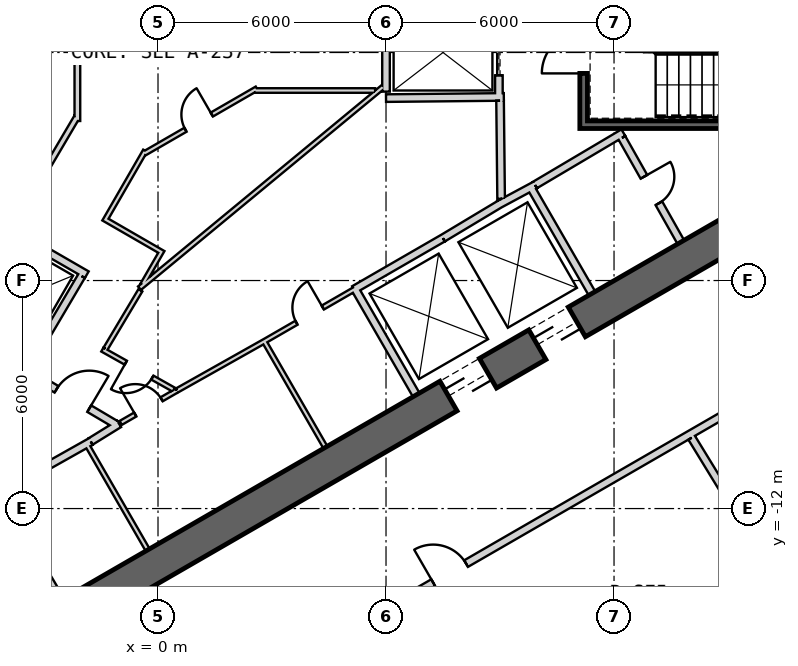
"""IFC4 building model, lengths in metres.
Left out: names, types, materials, properties, quantities, classifications, styles, units other than length and angle.
Written with IfcOpenShell. Run it as: python <this file> out.ifc"""

import sys

from ifc_helpers import new_model, si_unit, direction, frame, frame_2d, origin, place, context, subcontext, project, spatial, rectangle, extrude, element, fill, save


model = new_model("IFC4")
c1 = context("Model", 3, precision=1e-05, world=origin(), true_north=direction((0.0, 1.0)))
c2 = subcontext(c1, "Body", "Model", "MODEL_VIEW")
j1 = project(units=[si_unit("LENGTHUNIT", "METRE"), si_unit("PLANEANGLEUNIT", "RADIAN")], contexts=[c1])
p1 = place(None, origin())
s1 = spatial("IfcSite", under=j1, at=p1, CompositionType="ELEMENT")
p2 = place(p1, origin())
s2 = spatial("IfcBuilding", under=s1, at=p2, CompositionType="ELEMENT")
p3 = place(p2, frame((0.0, 0.0, 345.5)))
s3 = spatial("IfcBuildingStorey", under=s2, at=p3, CompositionType="ELEMENT", Elevation=345.5)
p4 = place(p3, frame((-7.825, -17.97, 0.0), z_axis=(0.0, 0.0, 1.0), x_axis=(0.866028369851, 0.499994862586, 0.0)))
e1 = element("IfcWall", 1, at=p4, inside=s3, PredefinedType="SHEAR", context=c2, shape_type="SweptSolid", body=[
    extrude(rectangle(XDim=31.523, YDim=0.9, at=frame_2d((15.762, 0.0))), origin(), (0.0, 0.0, 1.0), 3.9),
])
p5 = place(p4, frame((17.862, 0.0, 0.0)))
e2 = element("IfcOpeningElement", 2, at=p5, cuts=e1, PredefinedType="OPENING", context=c2, shape_type="SweptSolid", body=[
    extrude(rectangle(XDim=1.2, YDim=2.4, at=frame_2d((0.6, 1.2))), frame((0.0, 0.46, 0.0), z_axis=(0.0, -1.0, 0.0), x_axis=(1.0, 0.0, 0.0)), (0.0, 0.0, 1.0), 0.92),
])
p6 = place(p4, frame((20.562, 0.0, 0.0)))
e3 = element("IfcOpeningElement", 3, at=p6, cuts=e1, PredefinedType="OPENING", context=c2, shape_type="SweptSolid", body=[
    extrude(rectangle(XDim=1.2, YDim=2.4, at=frame_2d((0.6, 1.2))), frame((0.0, 0.46, 0.0), z_axis=(0.0, -1.0, 0.0), x_axis=(1.0, 0.0, 0.0)), (0.0, 0.0, 1.0), 0.92),
])
p7 = place(p4, frame((26.712, 0.0, 0.0)))
e4 = element("IfcOpeningElement", 4, at=p7, cuts=e1, PredefinedType="OPENING", context=c2, shape_type="SweptSolid", body=[
    extrude(rectangle(XDim=1.2, YDim=2.4, at=frame_2d((0.6, 1.2))), frame((0.0, 0.46, 0.0), z_axis=(0.0, -1.0, 0.0), x_axis=(1.0, 0.0, 0.0)), (0.0, 0.0, 1.0), 0.92),
])
p8 = place(p4, frame((3.612, 0.0, 0.0)))
e5 = element("IfcOpeningElement", 5, at=p8, cuts=e1, PredefinedType="OPENING", context=c2, shape_type="SweptSolid", body=[
    extrude(rectangle(XDim=1.2, YDim=2.4, at=frame_2d((0.6, 1.2))), frame((0.0, 0.46, 0.0), z_axis=(0.0, -1.0, 0.0), x_axis=(1.0, 0.0, 0.0)), (0.0, 0.0, 1.0), 0.92),
])
p9 = place(p3, frame((6.795, -9.01, 0.0), z_axis=(0.0, 0.0, 1.0), x_axis=(-0.499984717929, 0.866034226713, 0.0)))
e6 = element("IfcWall", 6, at=p9, inside=s3, PredefinedType="PLUMBINGWALL", context=c2, shape_type="SweptSolid", body=[
    extrude(rectangle(XDim=3.25, YDim=0.2, at=frame_2d((1.625, 0.0))), origin(), (0.0, 0.0, 1.0), 3.6),
])
p10 = place(p3, frame((5.159, -6.236, 0.0), z_axis=(0.0, 0.0, 1.0), x_axis=(0.866036505625, 0.499980770555, 0.0)))
e7 = element("IfcWall", 7, at=p10, inside=s3, PredefinedType="PLUMBINGWALL", context=c2, shape_type="SweptSolid", body=[
    extrude(rectangle(XDim=2.7, YDim=0.2, at=frame_2d((1.35, 0.0))), origin(), (0.0, 0.0, 1.0), 3.6),
])
p11 = place(p3, frame((9.795, -3.525, 0.0), z_axis=(0.0, 0.0, 1.0), x_axis=(0.499984717929, -0.866034226713, 0.0)))
e8 = element("IfcWall", 8, at=p11, inside=s3, PredefinedType="PLUMBINGWALL", context=c2, shape_type="SweptSolid", body=[
    extrude(rectangle(XDim=3.25, YDim=0.2, at=frame_2d((1.625, 0.0))), origin(), (0.0, 0.0, 1.0), 3.6),
])
p12 = place(p3, frame((8.974, -3.999, 0.0), z_axis=(0.0, 0.0, 1.0), x_axis=(0.880907015104, 0.473289373154, 0.0)))
e9 = element("IfcWall", 9, at=p12, inside=s3, PredefinedType="PLUMBINGWALL", context=c2, shape_type="SweptSolid", body=[
    extrude(rectangle(XDim=1.078, YDim=0.2, at=frame_2d((0.539, 0.0))), origin(), (0.0, 0.0, 1.0), 3.6),
])
p13 = place(p3, frame((7.497, -4.886, 0.0), z_axis=(0.0, 0.0, 1.0), x_axis=(0.857516281273, 0.51445682749, 0.0)))
e10 = element("IfcWall", 10, at=p13, inside=s3, PredefinedType="PLUMBINGWALL", context=c2, shape_type="SweptSolid", body=[
    extrude(rectangle(XDim=1.845, YDim=0.2, at=frame_2d((0.922, 0.0))), origin(), (0.0, 0.0, 1.0), 3.6),
])
p14 = place(p3, frame((11.1, -1.9, -0.3), z_axis=(0.0, 0.0, 1.0), x_axis=(1.0, 0.0, 0.0)))
e11 = element("IfcWall", 11, at=p14, inside=s3, PredefinedType="SHEAR", context=c2, shape_type="SweptSolid", body=[
    extrude(rectangle(XDim=7.9, YDim=0.2, at=frame_2d((3.95, 0.0))), origin(), (0.0, 0.0, 1.0), 3.9),
])
p15 = place(p3, frame((11.2, -1.8, -0.3), z_axis=(0.0, 0.0, 1.0), x_axis=(0.0, 1.0, 0.0)))
e12 = element("IfcWall", 12, at=p15, inside=s3, PredefinedType="SHEAR", context=c2, shape_type="SweptSolid", body=[
    extrude(rectangle(XDim=3.6, YDim=0.2, at=frame_2d((1.8, 0.0))), origin(), (0.0, 0.0, 1.0), 3.9),
])
p16 = place(p15, frame((1.25, 0.0, 0.3)))
e13 = element("IfcOpeningElement", 13, at=p16, cuts=e12, PredefinedType="OPENING", context=c2, shape_type="SweptSolid", body=[
    extrude(rectangle(XDim=1.1, YDim=2.1, at=frame_2d((0.55, 1.05))), frame((0.0, 0.11, 0.0), z_axis=(0.0, -1.0, 0.0), x_axis=(1.0, 0.0, 0.0)), (0.0, 0.0, 1.0), 0.22),
])
p17 = place(p3, frame((8.97, 1.2, 0.0), z_axis=(0.0, 0.0, 1.0), x_axis=(0.0, -1.0, 0.0)))
e14 = element("IfcWall", 14, at=p17, inside=s3, PredefinedType="PLUMBINGWALL", context=c2, shape_type="SweptSolid", body=[
    extrude(rectangle(XDim=2.4, YDim=0.2, at=frame_2d((1.2, 0.0))), origin(), (0.0, 0.0, 1.0), 3.6),
])
p18 = place(p17, frame((0.6, 0.0, 0.0)))
e15 = element("IfcOpeningElement", 15, at=p18, cuts=e14, PredefinedType="OPENING", context=c2, shape_type="SweptSolid", body=[
    extrude(rectangle(XDim=1.2, YDim=2.4, at=frame_2d((0.6, 1.2))), frame((0.0, 0.11, 0.0), z_axis=(0.0, -1.0, 0.0), x_axis=(1.0, 0.0, 0.0)), (0.0, 0.0, 1.0), 0.22),
])
p19 = place(p3, frame((9.1, -1.169, 0.0), z_axis=(0.0, 0.0, 1.0), x_axis=(-0.999949988, -0.010001074852, 0.0)))
e16 = element("IfcWall", 16, at=p19, inside=s3, PredefinedType="PLUMBINGWALL", context=c2, shape_type="SweptSolid", body=[
    extrude(rectangle(XDim=3.1, YDim=0.2, at=frame_2d((1.55, 0.0))), origin(), (0.0, 0.0, 1.0), 3.6),
])
p20 = place(p3, frame((6.0, -1.03, 0.0), z_axis=(0.0, 0.0, 1.0), x_axis=(0.0, 1.0, 0.0)))
e17 = element("IfcWall", 17, at=p20, inside=s3, PredefinedType="PLUMBINGWALL", context=c2, shape_type="SweptSolid", body=[
    extrude(rectangle(XDim=2.33, YDim=0.2, at=frame_2d((1.165, 0.0))), origin(), (0.0, 0.0, 1.0), 3.6),
])
p21 = place(p3, frame((-3.957, -4.644, 0.0), z_axis=(0.0, 0.0, 1.0), x_axis=(0.865991127953, -0.500059362782, 0.0)))
e18 = element("IfcWall", 18, at=p21, inside=s3, PredefinedType="PLUMBINGWALL", context=c2, shape_type="SweptSolid", body=[
    extrude(rectangle(XDim=2.405, YDim=0.2, at=frame_2d((1.202, 0.0))), origin(), (0.0, 0.0, 1.0), 3.6),
])
p22 = place(p3, frame((-2.012, -5.882, 0.0), z_axis=(0.0, 0.0, 1.0), x_axis=(-0.508619639323, -0.860991325447, 0.0)))
e19 = element("IfcWall", 19, at=p22, inside=s3, PredefinedType="PLUMBINGWALL", context=c2, shape_type="SweptSolid", body=[
    extrude(rectangle(XDim=3.0, YDim=0.2, at=frame_2d((1.5, 0.0))), origin(), (0.0, 0.0, 1.0), 3.6),
])
p23 = place(p3, frame((-1.897, -10.275, 0.0), z_axis=(0.0, 0.0, 1.0), x_axis=(0.499984717929, -0.866034226713, 0.0)))
e20 = element("IfcWall", 20, at=p23, inside=s3, PredefinedType="PARTITIONING", context=c2, shape_type="SweptSolid", body=[
    extrude(rectangle(XDim=3.25, YDim=0.12, at=frame_2d((1.625, 0.0))), origin(), (0.0, 0.0, 1.0), 3.6),
])
p24 = place(p3, frame((-4.26, -11.524, 0.0), z_axis=(0.0, 0.0, 1.0), x_axis=(0.507997497166, -0.861358544901, 0.0)))
e21 = element("IfcWall", 21, at=p24, inside=s3, PredefinedType="PARTITIONING", context=c2, shape_type="SweptSolid", body=[
    extrude(rectangle(XDim=3.35, YDim=0.2, at=frame_2d((1.675, 0.0))), origin(), (0.0, 0.0, 1.0), 3.6),
])
p25 = place(p24, frame((1.325, 0.0, 0.0)))
e22 = element("IfcOpeningElement", 22, at=p25, cuts=e21, PredefinedType="OPENING", context=c2, shape_type="SweptSolid", body=[
    extrude(rectangle(XDim=0.8, YDim=2.1, at=frame_2d((0.4, 1.05))), frame((0.0, 0.11, 0.0), z_axis=(0.0, -1.0, 0.0), x_axis=(1.0, 0.0, 0.0)), (0.0, 0.0, 1.0), 0.22),
])
p26 = place(p3, frame((-1.769, -10.237, 0.0), z_axis=(0.0, 0.0, 1.0), x_axis=(-0.871534483978, -0.490334215854, 0.0)))
e23 = element("IfcWall", 23, at=p26, inside=s3, PredefinedType="PARTITIONING", context=c2, shape_type="SweptSolid", body=[
    extrude(rectangle(XDim=2.7, YDim=0.2, at=frame_2d((1.35, 0.0))), origin(), (0.0, 0.0, 1.0), 3.6),
])
p27 = place(p3, frame((4.405, -10.389, 0.0), z_axis=(0.0, 0.0, 1.0), x_axis=(-0.500017246033, 0.866015446554, 0.0)))
e24 = element("IfcWall", 24, at=p27, inside=s3, PredefinedType="PARTITIONING", context=c2, shape_type="SweptSolid", body=[
    extrude(rectangle(XDim=3.25, YDim=0.12, at=frame_2d((1.625, 0.0))), origin(), (0.0, 0.0, 1.0), 3.6),
])
p28 = place(p3, frame((-1.024, -9.771, 0.0), z_axis=(0.0, 0.0, 1.0), x_axis=(-0.850348075135, -0.526220629693, 0.0)))
e25 = element("IfcWall", 25, at=p28, inside=s3, PredefinedType="PARTITIONING", context=c2, shape_type="SweptSolid", body=[
    extrude(rectangle(XDim=0.878, YDim=0.2, at=frame_2d((0.439, 0.0))), origin(), (0.0, 0.0, 1.0), 3.6),
])
p29 = place(p3, frame((0.494, -8.896, 0.0), z_axis=(0.0, 0.0, 1.0), x_axis=(0.871426548871, 0.490526013503, 0.0)))
e26 = element("IfcWall", 26, at=p29, inside=s3, PredefinedType="PARTITIONING", context=c2, shape_type="SweptSolid", body=[
    extrude(rectangle(XDim=2.67, YDim=0.12, at=frame_2d((1.335, 0.0))), origin(), (0.0, 0.0, 1.0), 3.6),
])
p30 = place(p3, frame((0.493, -8.895, 0.0), z_axis=(0.0, 0.0, 1.0), x_axis=(-0.866027945518, -0.499995597562, 0.0)))
e27 = element("IfcWall", 27, at=p30, inside=s3, PredefinedType="PARTITIONING", context=c2, shape_type="SweptSolid", body=[
    extrude(rectangle(XDim=1.702, YDim=0.12, at=frame_2d((0.851, 0.0))), origin(), (0.0, 0.0, 1.0), 3.6),
])
p31 = place(p30, frame((0.461, 0.0, 0.0)))
e28 = element("IfcOpeningElement", 28, at=p31, cuts=e27, PredefinedType="OPENING", context=c2, shape_type="SweptSolid", body=[
    extrude(rectangle(XDim=0.8, YDim=2.1, at=frame_2d((0.4, 1.05))), frame((0.0, 0.07, 0.0), z_axis=(0.0, -1.0, 0.0), x_axis=(1.0, 0.0, 0.0)), (0.0, 0.0, 1.0), 0.14),
])
p32 = place(p3, frame((2.821, -7.586, 0.0), z_axis=(0.0, 0.0, 1.0), x_axis=(0.866019956843, 0.50000943426, 0.0)))
e29 = element("IfcWall", 29, at=p32, inside=s3, PredefinedType="PARTITIONING", context=c2, shape_type="SweptSolid", body=[
    extrude(rectangle(XDim=2.7, YDim=0.12, at=frame_2d((1.35, 0.0))), origin(), (0.0, 0.0, 1.0), 3.6),
])
p33 = place(p32, frame((0.95, 0.0, 0.0)))
e30 = element("IfcOpeningElement", 30, at=p33, cuts=e29, PredefinedType="OPENING", context=c2, shape_type="SweptSolid", body=[
    extrude(rectangle(XDim=0.8, YDim=2.1, at=frame_2d((0.4, 1.05))), frame((0.0, 0.07, 0.0), z_axis=(0.0, -1.0, 0.0), x_axis=(1.0, 0.0, 0.0)), (0.0, 0.0, 1.0), 0.14),
])
p34 = place(p3, frame((12.245, -2.109, 0.0), z_axis=(0.0, 0.0, 1.0), x_axis=(-0.860414880418, -0.509594185166, 0.0)))
e31 = element("IfcWall", 31, at=p34, inside=s3, PredefinedType="PARTITIONING", context=c2, shape_type="SweptSolid", body=[
    extrude(rectangle(XDim=2.7, YDim=0.2, at=frame_2d((1.35, 0.0))), origin(), (0.0, 0.0, 1.0), 3.6),
])
p35 = place(p3, frame((13.758, -4.99, 0.0), z_axis=(0.0, 0.0, 1.0), x_axis=(-0.491993409184, 0.87059892334, 0.0)))
e32 = element("IfcWall", 32, at=p35, inside=s3, PredefinedType="PARTITIONING", context=c2, shape_type="SweptSolid", body=[
    extrude(rectangle(XDim=3.15, YDim=0.2, at=frame_2d((1.575, 0.0))), origin(), (0.0, 0.0, 1.0), 3.6),
])
p36 = place(p35, frame((1.175, 0.0, 0.0)))
e33 = element("IfcOpeningElement", 33, at=p36, cuts=e32, PredefinedType="OPENING", context=c2, shape_type="SweptSolid", body=[
    extrude(rectangle(XDim=0.8, YDim=2.1, at=frame_2d((0.4, 1.05))), frame((0.0, 0.11, 0.0), z_axis=(0.0, -1.0, 0.0), x_axis=(1.0, 0.0, 0.0)), (0.0, 0.0, 1.0), 0.22),
])
p37 = place(p3, frame((9.029, -3.851, 0.0), z_axis=(0.0, 0.0, 1.0), x_axis=(-0.010784614026, 0.999941844359, 0.0)))
e34 = element("IfcWall", 34, at=p37, inside=s3, PredefinedType="PARTITIONING", context=c2, shape_type="SweptSolid", body=[
    extrude(rectangle(XDim=2.581, YDim=0.2, at=frame_2d((1.291, 0.0))), origin(), (0.0, 0.0, 1.0), 3.6),
])
p38 = place(p3, frame((-3.401, -8.43, 0.0), z_axis=(0.0, 0.0, 1.0), x_axis=(0.860617791406, -0.509251428192, 0.0)))
e35 = element("IfcWall", 35, at=p38, inside=s3, PredefinedType="PARTITIONING", context=c2, shape_type="SweptSolid", body=[
    extrude(rectangle(XDim=2.709, YDim=0.2, at=frame_2d((1.354, 0.0))), origin(), (0.0, 0.0, 1.0), 3.6),
])
p39 = place(p38, frame((0.848, 0.0, 0.0)))
e36 = element("IfcOpeningElement", 36, at=p39, cuts=e35, PredefinedType="OPENING", context=c2, shape_type="SweptSolid", body=[
    extrude(rectangle(XDim=1.0, YDim=2.1, at=frame_2d((0.5, 1.05))), frame((0.0, 0.11, 0.0), z_axis=(0.0, -1.0, 0.0), x_axis=(1.0, 0.0, 0.0)), (0.0, 0.0, 1.0), 0.22),
])
p40 = place(p3, frame((-2.122, -1.802, 0.0), z_axis=(0.0, 0.0, 1.0), x_axis=(0.0, 1.0, 0.0)))
e37 = element("IfcWall", 37, at=p40, inside=s3, PredefinedType="PLUMBINGWALL", context=c2, shape_type="SweptSolid", body=[
    extrude(rectangle(XDim=3.454, YDim=0.15, at=frame_2d((1.727, 0.0))), origin(), (0.0, 0.0, 1.0), 3.6),
])
p41 = place(p3, frame((-3.841, -4.595, 0.0), z_axis=(0.0, 0.0, 1.0), x_axis=(0.507318157939, 0.861758833216, 0.0)))
e38 = element("IfcWall", 38, at=p41, inside=s3, PredefinedType="PLUMBINGWALL", context=c2, shape_type="SweptSolid", body=[
    extrude(rectangle(XDim=3.365, YDim=0.15, at=frame_2d((1.682, 0.0))), origin(), (0.0, 0.0, 1.0), 3.6),
])
p42 = place(p3, frame((5.936, -0.894, 0.0), z_axis=(0.0, 0.0, 1.0), x_axis=(-0.770832870475, -0.637037428881, 0.0)))
e39 = element("IfcWall", 39, at=p42, inside=s3, PredefinedType="PARTITIONING", context=c2, shape_type="SweptSolid", body=[
    extrude(rectangle(XDim=8.332, YDim=0.12, at=frame_2d((4.166, 0.0))), origin(), (0.0, 0.0, 1.0), 3.6),
])
p43 = place(p3, frame((-0.411, -6.111, 0.0), z_axis=(0.0, 0.0, 1.0), x_axis=(0.49986229611, 0.866104892567, 0.0)))
e40 = element("IfcWall", 40, at=p43, inside=s3, PredefinedType="PARTITIONING", context=c2, shape_type="SweptSolid", body=[
    extrude(rectangle(XDim=1.058, YDim=0.12, at=frame_2d((0.529, 0.0))), origin(), (0.0, 0.0, 1.0), 3.6),
])
p44 = place(p3, frame((-1.436, -4.367, 0.0), z_axis=(0.0, 0.0, 1.0), x_axis=(0.866087547558, -0.499892348375, 0.0)))
e41 = element("IfcWall", 41, at=p44, inside=s3, PredefinedType="PARTITIONING", context=c2, shape_type="SweptSolid", body=[
    extrude(rectangle(XDim=1.7, YDim=0.12, at=frame_2d((0.85, 0.0))), origin(), (0.0, 0.0, 1.0), 3.6),
])
p45 = place(p3, frame((-0.338, -2.585, 0.0), z_axis=(0.0, 0.0, 1.0), x_axis=(-0.50002743572, -0.866009563185, 0.0)))
e42 = element("IfcWall", 42, at=p45, inside=s3, PredefinedType="PARTITIONING", context=c2, shape_type="SweptSolid", body=[
    extrude(rectangle(XDim=2.033, YDim=0.12, at=frame_2d((1.016, 0.0))), origin(), (0.0, 0.0, 1.0), 3.6),
])
p46 = place(p3, frame((2.602, -0.948, 0.0), z_axis=(0.0, 0.0, 1.0), x_axis=(-0.86601279846, -0.500021832428, 0.0)))
e43 = element("IfcWall", 43, at=p46, inside=s3, PredefinedType="PARTITIONING", context=c2, shape_type="SweptSolid", body=[
    extrude(rectangle(XDim=3.435, YDim=0.12, at=frame_2d((1.718, 0.0))), origin(), (0.0, 0.0, 1.0), 3.6),
])
p47 = place(p46, frame((1.37, 0.0, 0.0)))
e44 = element("IfcOpeningElement", 44, at=p47, cuts=e43, PredefinedType="OPENING", context=c2, shape_type="SweptSolid", body=[
    extrude(rectangle(XDim=0.8, YDim=2.1, at=frame_2d((0.4, 1.05))), frame((0.0, 0.07, 0.0), z_axis=(0.0, -1.0, 0.0), x_axis=(1.0, 0.0, 0.0)), (0.0, 0.0, 1.0), 0.14),
])
p48 = place(p3, frame((5.713, -1.0, 0.0), z_axis=(0.0, 0.0, 1.0), x_axis=(-1.0, 0.0, 0.0)))
e45 = element("IfcWall", 45, at=p48, inside=s3, PredefinedType="PARTITIONING", context=c2, shape_type="SweptSolid", body=[
    extrude(rectangle(XDim=3.183, YDim=0.12, at=frame_2d((1.591, 0.0))), origin(), (0.0, 0.0, 1.0), 3.6),
])
p49 = place(p3, frame((-1.464, -7.816, 0.0), z_axis=(0.0, 0.0, 1.0), x_axis=(0.871859859416, -0.489755434416, 0.0)))
e46 = element("IfcWall", 46, at=p49, inside=s3, PredefinedType="PARTITIONING", context=c2, shape_type="SweptSolid", body=[
    extrude(rectangle(XDim=2.155, YDim=0.12, at=frame_2d((1.077, 0.0))), origin(), (0.0, 0.0, 1.0), 3.6),
])
p50 = place(p49, frame((0.707, 0.0, 0.0)))
e47 = element("IfcOpeningElement", 47, at=p50, cuts=e46, PredefinedType="OPENING", context=c2, shape_type="SweptSolid", body=[
    extrude(rectangle(XDim=0.8, YDim=2.1, at=frame_2d((0.4, 1.05))), frame((0.0, 0.07, 0.0), z_axis=(0.0, -1.0, 0.0), x_axis=(1.0, 0.0, 0.0)), (0.0, 0.0, 1.0), 0.14),
])
p51 = place(p3, frame((-0.463, -6.257, 0.0), z_axis=(0.0, 0.0, 1.0), x_axis=(-0.512528878122, -0.858669988466, 0.0)))
e48 = element("IfcWall", 48, at=p51, inside=s3, PredefinedType="PARTITIONING", context=c2, shape_type="SweptSolid", body=[
    extrude(rectangle(XDim=1.79, YDim=0.12, at=frame_2d((0.895, 0.0))), origin(), (0.0, 0.0, 1.0), 3.6),
])
p52 = place(p3, frame((-6.505, -21.885, 0.0), z_axis=(0.0, 0.0, 1.0), x_axis=(0.86602457258, 0.500001439686, 0.0)))
e49 = element("IfcWall", 49, at=p52, inside=s3, PredefinedType="PARTITIONING", context=c2, shape_type="SweptSolid", body=[
    extrude(rectangle(XDim=32.952, YDim=0.2, at=frame_2d((16.476, 0.0))), origin(), (0.0, 0.0, 1.0), 2.97),
])
p53 = place(p52, frame((27.839, 0.0, 0.0)))
e50 = element("IfcOpeningElement", 50, at=p53, cuts=e49, PredefinedType="OPENING", context=c2, shape_type="SweptSolid", body=[
    extrude(rectangle(XDim=1.0, YDim=2.1, at=frame_2d((0.5, 1.05))), frame((0.0, 0.11, 0.0), z_axis=(0.0, -1.0, 0.0), x_axis=(1.0, 0.0, 0.0)), (0.0, 0.0, 1.0), 0.22),
])
p54 = place(p52, frame((15.873, 0.0, 0.0)))
e51 = element("IfcOpeningElement", 51, at=p54, cuts=e49, PredefinedType="OPENING", context=c2, shape_type="SweptSolid", body=[
    extrude(rectangle(XDim=1.0, YDim=2.1, at=frame_2d((0.5, 1.05))), frame((0.0, 0.11, 0.0), z_axis=(0.0, -1.0, 0.0), x_axis=(1.0, 0.0, 0.0)), (0.0, 0.0, 1.0), 0.22),
])
p55 = place(p52, frame((4.06, 0.0, 0.0)))
e52 = element("IfcOpeningElement", 52, at=p55, cuts=e49, PredefinedType="OPENING", context=c2, shape_type="SweptSolid", body=[
    extrude(rectangle(XDim=1.0, YDim=2.1, at=frame_2d((0.5, 1.05))), frame((0.0, 0.11, 0.0), z_axis=(0.0, -1.0, 0.0), x_axis=(1.0, 0.0, 0.0)), (0.0, 0.0, 1.0), 0.22),
])
p56 = place(p3, frame((14.042, -10.137, 0.0), z_axis=(0.0, 0.0, 1.0), x_axis=(0.522290974672, -0.852767340941, 0.0)))
e53 = element("IfcWall", 53, at=p56, inside=s3, PredefinedType="PARTITIONING", context=c2, shape_type="SweptSolid", body=[
    extrude(rectangle(XDim=9.885, YDim=0.2, at=frame_2d((4.942, 0.0))), origin(), (0.0, 0.0, 1.0), 3.6),
])
p57 = place(p16, origin())
e54 = element("IfcDoor", 54, at=p57, inside=s3, OperationType="SINGLE_SWING_LEFT", PredefinedType="USERDEFINED", context=c2, shape_type="SweptSolid", body=[
    extrude(rectangle(XDim=1.1, YDim=2.1, at=frame_2d((0.55, 1.05))), frame((0.0, 0.025, 0.0), z_axis=(0.0, -1.0, 0.0), x_axis=(1.0, 0.0, 0.0)), (0.0, 0.0, 1.0), 0.05),
])
fill(e13, e54)
p58 = place(p18, origin())
e55 = element("IfcDoor", 55, at=p58, inside=s3, OperationType="SLIDING_TO_LEFT", PredefinedType="USERDEFINED", context=c2, shape_type="SweptSolid", body=[
    extrude(rectangle(XDim=1.2, YDim=2.4, at=frame_2d((0.6, 1.2))), frame((0.0, 0.025, 0.0), z_axis=(0.0, -1.0, 0.0), x_axis=(1.0, 0.0, 0.0)), (0.0, 0.0, 1.0), 0.05),
])
fill(e15, e55)
p59 = place(p39, origin())
e56 = element("IfcDoor", 56, at=p59, inside=s3, OperationType="SINGLE_SWING_RIGHT", PredefinedType="USERDEFINED", context=c2, shape_type="SweptSolid", body=[
    extrude(rectangle(XDim=1.0, YDim=2.1, at=frame_2d((0.5, 1.05))), frame((0.0, 0.025, 0.0), z_axis=(0.0, -1.0, 0.0), x_axis=(1.0, 0.0, 0.0)), (0.0, 0.0, 1.0), 0.05),
])
fill(e36, e56)
p60 = place(p47, origin())
e57 = element("IfcDoor", 57, at=p60, inside=s3, OperationType="SINGLE_SWING_LEFT", PredefinedType="USERDEFINED", context=c2, shape_type="SweptSolid", body=[
    extrude(rectangle(XDim=0.8, YDim=2.1, at=frame_2d((0.4, 1.05))), frame((0.0, 0.025, 0.0), z_axis=(0.0, -1.0, 0.0), x_axis=(1.0, 0.0, 0.0)), (0.0, 0.0, 1.0), 0.05),
])
fill(e44, e57)
p61 = place(p50, origin())
e58 = element("IfcDoor", 58, at=p61, inside=s3, OperationType="SINGLE_SWING_RIGHT", PredefinedType="USERDEFINED", context=c2, shape_type="SweptSolid", body=[
    extrude(rectangle(XDim=0.8, YDim=2.1, at=frame_2d((0.4, 1.05))), frame((0.0, 0.025, 0.0), z_axis=(0.0, -1.0, 0.0), x_axis=(1.0, 0.0, 0.0)), (0.0, 0.0, 1.0), 0.05),
])
fill(e47, e58)
p62 = place(p31, origin())
e59 = element("IfcDoor", 59, at=p62, inside=s3, OperationType="SINGLE_SWING_LEFT", PredefinedType="USERDEFINED", context=c2, shape_type="SweptSolid", body=[
    extrude(rectangle(XDim=0.8, YDim=2.1, at=frame_2d((0.4, 1.05))), frame((0.0, 0.025, 0.0), z_axis=(0.0, -1.0, 0.0), x_axis=(1.0, 0.0, 0.0)), (0.0, 0.0, 1.0), 0.05),
])
fill(e28, e59)
p63 = place(p33, origin())
e60 = element("IfcDoor", 60, at=p63, inside=s3, OperationType="SINGLE_SWING_LEFT", PredefinedType="USERDEFINED", context=c2, shape_type="SweptSolid", body=[
    extrude(rectangle(XDim=0.8, YDim=2.1, at=frame_2d((0.4, 1.05))), frame((0.0, 0.025, 0.0), z_axis=(0.0, -1.0, 0.0), x_axis=(1.0, 0.0, 0.0)), (0.0, 0.0, 1.0), 0.05),
])
fill(e30, e60)
p64 = place(p36, origin())
e61 = element("IfcDoor", 61, at=p64, inside=s3, OperationType="SINGLE_SWING_RIGHT", PredefinedType="USERDEFINED", context=c2, shape_type="SweptSolid", body=[
    extrude(rectangle(XDim=0.8, YDim=2.1, at=frame_2d((0.4, 1.05))), frame((0.0, 0.025, 0.0), z_axis=(0.0, -1.0, 0.0), x_axis=(1.0, 0.0, 0.0)), (0.0, 0.0, 1.0), 0.05),
])
fill(e33, e61)
p65 = place(p54, origin())
e62 = element("IfcDoor", 62, at=p65, inside=s3, OperationType="SINGLE_SWING_RIGHT", PredefinedType="USERDEFINED", context=c2, shape_type="SweptSolid", body=[
    extrude(rectangle(XDim=1.0, YDim=2.1, at=frame_2d((0.5, 1.05))), frame((0.0, 0.025, 0.0), z_axis=(0.0, -1.0, 0.0), x_axis=(1.0, 0.0, 0.0)), (0.0, 0.0, 1.0), 0.05),
])
fill(e51, e62)
p66 = place(p5, origin())
e63 = element("IfcDoor", 63, at=p66, inside=s3, OperationType="SLIDING_TO_LEFT", PredefinedType="USERDEFINED", context=c2, shape_type="SweptSolid", body=[
    extrude(rectangle(XDim=1.2, YDim=2.4, at=frame_2d((0.6, 1.2))), frame((0.0, 0.025, 0.0), z_axis=(0.0, -1.0, 0.0), x_axis=(1.0, 0.0, 0.0)), (0.0, 0.0, 1.0), 0.05),
])
fill(e2, e63)
p67 = place(p6, origin())
e64 = element("IfcDoor", 64, at=p67, inside=s3, OperationType="SLIDING_TO_LEFT", PredefinedType="USERDEFINED", context=c2, shape_type="SweptSolid", body=[
    extrude(rectangle(XDim=1.2, YDim=2.4, at=frame_2d((0.6, 1.2))), frame((0.0, 0.025, 0.0), z_axis=(0.0, -1.0, 0.0), x_axis=(1.0, 0.0, 0.0)), (0.0, 0.0, 1.0), 0.05),
])
fill(e3, e64)
save(model, sys.argv[1])
